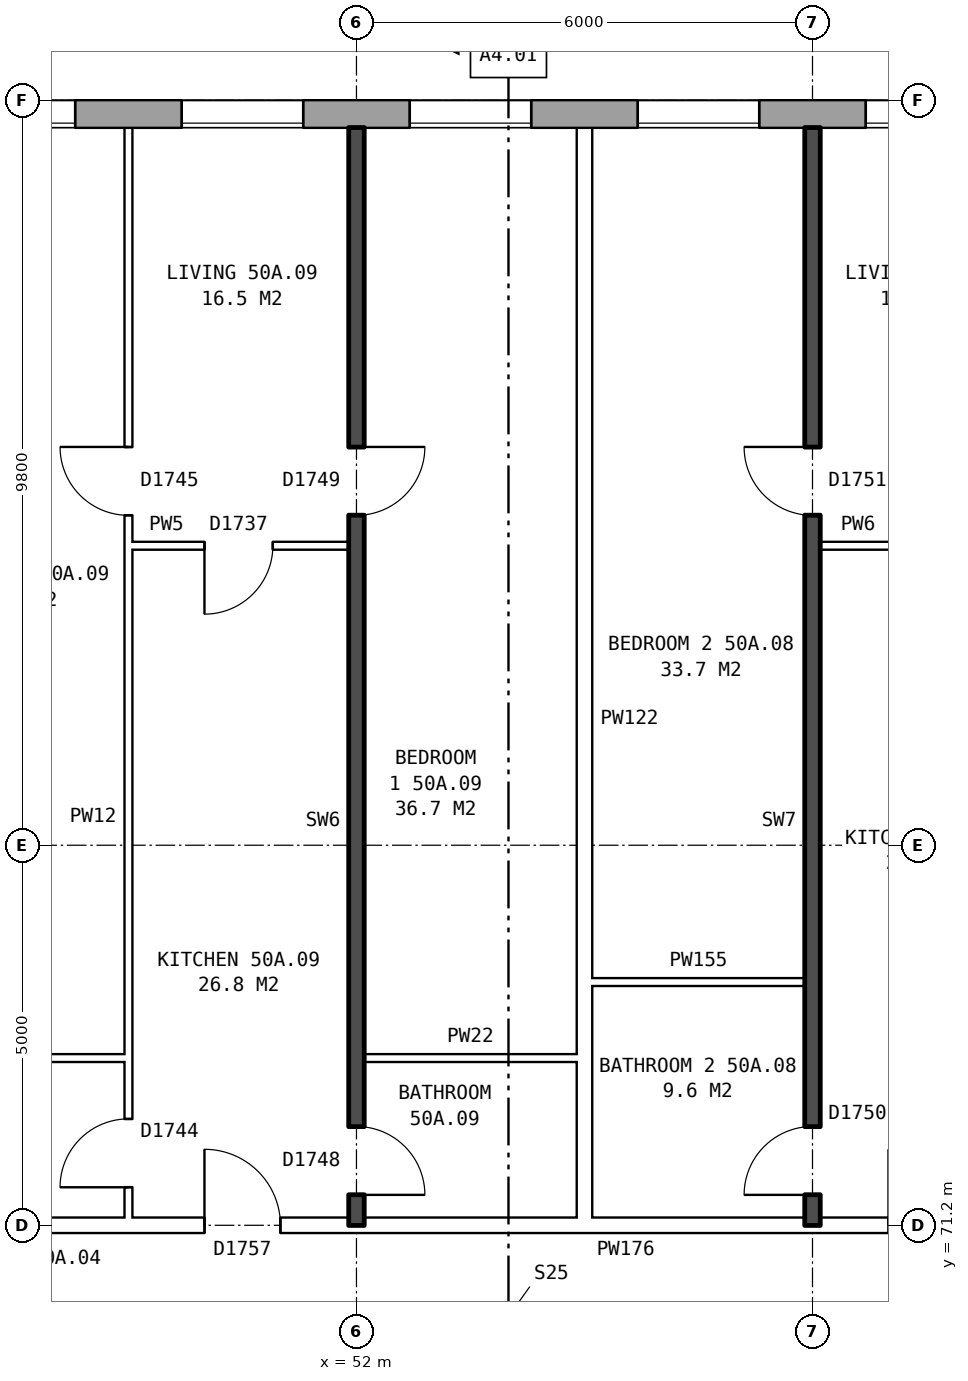
"""IFC4 building model, lengths in metres.
Left out: names, types, materials, properties, quantities, classifications, styles, units other than length and angle.
Written with IfcOpenShell. Run it as: python <this file> out.ifc"""

import sys

from ifc_helpers import new_model, si_unit, direction, frame, frame_2d, origin, place, context, subcontext, project, spatial, rectangle, extrude, element, fill, save


model = new_model("IFC4")
c1 = context("Model", 3, precision=1e-05, world=origin(), true_north=direction((0.0, 1.0)))
c2 = subcontext(c1, "Body", "Model", "MODEL_VIEW")
j1 = project(units=[si_unit("LENGTHUNIT", "METRE"), si_unit("PLANEANGLEUNIT", "RADIAN")], contexts=[c1])
p1 = place(None, origin())
s1 = spatial("IfcSite", under=j1, at=p1, CompositionType="ELEMENT")
p2 = place(p1, origin())
s2 = spatial("IfcBuilding", under=s1, at=p2, CompositionType="ELEMENT")
p3 = place(p2, frame((0.0, 0.0, 178.9)))
s3 = spatial("IfcBuildingStorey", under=s2, at=p3, CompositionType="ELEMENT", Elevation=178.9)
p4 = place(p3, frame((72.925, 85.82, 0.0), z_axis=(0.0, 0.0, 1.0), x_axis=(-1.0, 0.0, 0.0)))
e1 = element("IfcWall", 1, at=p4, inside=s3, PredefinedType="STANDARD", context=c2, shape_type="SweptSolid", body=[
    extrude(rectangle(XDim=39.601, YDim=0.36, at=frame_2d((19.8, 0.0))), origin(), (0.0, 0.0, 1.0), 2.85),
])
p5 = place(p4, frame((0.625, 0.0, 0.8)))
e2 = element("IfcOpeningElement", 2, at=p5, cuts=e1, PredefinedType="OPENING", context=c2, shape_type="SweptSolid", body=[
    extrude(rectangle(XDim=1.6, YDim=1.8, at=frame_2d((0.8, 0.9))), frame((0.0, 0.19, 0.0), z_axis=(0.0, -1.0, 0.0), x_axis=(1.0, 0.0, 0.0)), (0.0, 0.0, 1.0), 0.38),
])
p6 = place(p4, frame((3.125, 0.0, 0.8)))
e3 = element("IfcOpeningElement", 3, at=p6, cuts=e1, PredefinedType="OPENING", context=c2, shape_type="SweptSolid", body=[
    extrude(rectangle(XDim=1.6, YDim=1.8, at=frame_2d((0.8, 0.9))), frame((0.0, 0.19, 0.0), z_axis=(0.0, -1.0, 0.0), x_axis=(1.0, 0.0, 0.0)), (0.0, 0.0, 1.0), 0.38),
])
p7 = place(p4, frame((5.025, 0.0, 1.7)))
e4 = element("IfcOpeningElement", 4, at=p7, cuts=e1, PredefinedType="OPENING", context=c2, shape_type="SweptSolid", body=[
    extrude(rectangle(XDim=0.6, YDim=0.9, at=frame_2d((0.3, 0.45))), frame((0.0, 0.19, 0.0), z_axis=(0.0, -1.0, 0.0), x_axis=(1.0, 0.0, 0.0)), (0.0, 0.0, 1.0), 0.38),
])
p8 = place(p4, frame((9.625, 0.0, 0.8)))
e5 = element("IfcOpeningElement", 5, at=p8, cuts=e1, PredefinedType="OPENING", context=c2, shape_type="SweptSolid", body=[
    extrude(rectangle(XDim=1.6, YDim=1.8, at=frame_2d((0.8, 0.9))), frame((0.0, 0.19, 0.0), z_axis=(0.0, -1.0, 0.0), x_axis=(1.0, 0.0, 0.0)), (0.0, 0.0, 1.0), 0.38),
])
p9 = place(p4, frame((12.625, 0.0, 0.8)))
e6 = element("IfcOpeningElement", 6, at=p9, cuts=e1, PredefinedType="OPENING", context=c2, shape_type="SweptSolid", body=[
    extrude(rectangle(XDim=1.6, YDim=1.8, at=frame_2d((0.8, 0.9))), frame((0.0, 0.19, 0.0), z_axis=(0.0, -1.0, 0.0), x_axis=(1.0, 0.0, 0.0)), (0.0, 0.0, 1.0), 0.38),
])
p10 = place(p4, frame((15.625, 0.0, 0.8)))
e7 = element("IfcOpeningElement", 7, at=p10, cuts=e1, PredefinedType="OPENING", context=c2, shape_type="SweptSolid", body=[
    extrude(rectangle(XDim=1.6, YDim=1.8, at=frame_2d((0.8, 0.9))), frame((0.0, 0.19, 0.0), z_axis=(0.0, -1.0, 0.0), x_axis=(1.0, 0.0, 0.0)), (0.0, 0.0, 1.0), 0.38),
])
p11 = place(p4, frame((18.625, 0.0, 0.8)))
e8 = element("IfcOpeningElement", 8, at=p11, cuts=e1, PredefinedType="OPENING", context=c2, shape_type="SweptSolid", body=[
    extrude(rectangle(XDim=1.6, YDim=1.8, at=frame_2d((0.8, 0.9))), frame((0.0, 0.19, 0.0), z_axis=(0.0, -1.0, 0.0), x_axis=(1.0, 0.0, 0.0)), (0.0, 0.0, 1.0), 0.38),
])
p12 = place(p4, frame((21.625, 0.0, 0.8)))
e9 = element("IfcOpeningElement", 9, at=p12, cuts=e1, PredefinedType="OPENING", context=c2, shape_type="SweptSolid", body=[
    extrude(rectangle(XDim=1.6, YDim=1.8, at=frame_2d((0.8, 0.9))), frame((0.0, 0.19, 0.0), z_axis=(0.0, -1.0, 0.0), x_axis=(1.0, 0.0, 0.0)), (0.0, 0.0, 1.0), 0.38),
])
p13 = place(p4, frame((24.625, 0.0, 0.8)))
e10 = element("IfcOpeningElement", 10, at=p13, cuts=e1, PredefinedType="OPENING", context=c2, shape_type="SweptSolid", body=[
    extrude(rectangle(XDim=1.6, YDim=1.8, at=frame_2d((0.8, 0.9))), frame((0.0, 0.19, 0.0), z_axis=(0.0, -1.0, 0.0), x_axis=(1.0, 0.0, 0.0)), (0.0, 0.0, 1.0), 0.38),
])
p14 = place(p4, frame((27.625, 0.0, 0.8)))
e11 = element("IfcOpeningElement", 11, at=p14, cuts=e1, PredefinedType="OPENING", context=c2, shape_type="SweptSolid", body=[
    extrude(rectangle(XDim=1.6, YDim=1.8, at=frame_2d((0.8, 0.9))), frame((0.0, 0.19, 0.0), z_axis=(0.0, -1.0, 0.0), x_axis=(1.0, 0.0, 0.0)), (0.0, 0.0, 1.0), 0.38),
])
p15 = place(p4, frame((30.625, 0.0, 0.8)))
e12 = element("IfcOpeningElement", 12, at=p15, cuts=e1, PredefinedType="OPENING", context=c2, shape_type="SweptSolid", body=[
    extrude(rectangle(XDim=1.6, YDim=1.8, at=frame_2d((0.8, 0.9))), frame((0.0, 0.19, 0.0), z_axis=(0.0, -1.0, 0.0), x_axis=(1.0, 0.0, 0.0)), (0.0, 0.0, 1.0), 0.38),
])
p16 = place(p4, frame((33.925, 0.0, 1.7)))
e13 = element("IfcOpeningElement", 13, at=p16, cuts=e1, PredefinedType="OPENING", context=c2, shape_type="SweptSolid", body=[
    extrude(rectangle(XDim=0.6, YDim=0.9, at=frame_2d((0.3, 0.45))), frame((0.0, 0.19, 0.0), z_axis=(0.0, -1.0, 0.0), x_axis=(1.0, 0.0, 0.0)), (0.0, 0.0, 1.0), 0.38),
])
p17 = place(p4, frame((36.625, 0.0, 0.8)))
e14 = element("IfcOpeningElement", 14, at=p17, cuts=e1, PredefinedType="OPENING", context=c2, shape_type="SweptSolid", body=[
    extrude(rectangle(XDim=1.6, YDim=1.8, at=frame_2d((0.8, 0.9))), frame((0.0, 0.19, 0.0), z_axis=(0.0, -1.0, 0.0), x_axis=(1.0, 0.0, 0.0)), (0.0, 0.0, 1.0), 0.38),
])
p18 = place(p4, frame((6.825, 0.0, 0.8)))
e15 = element("IfcOpeningElement", 15, at=p18, cuts=e1, PredefinedType="OPENING", context=c2, shape_type="SweptSolid", body=[
    extrude(rectangle(XDim=0.6, YDim=0.9, at=frame_2d((0.3, 0.45))), frame((0.0, 0.19, 0.0), z_axis=(0.0, -1.0, 0.0), x_axis=(1.0, 0.0, 0.0)), (0.0, 0.0, 1.0), 0.38),
])
p19 = place(p4, frame((7.725, 0.0, 0.8)))
e16 = element("IfcOpeningElement", 16, at=p19, cuts=e1, PredefinedType="OPENING", context=c2, shape_type="SweptSolid", body=[
    extrude(rectangle(XDim=1.0, YDim=1.8, at=frame_2d((0.5, 0.9))), frame((0.0, 0.19, 0.0), z_axis=(0.0, -1.0, 0.0), x_axis=(1.0, 0.0, 0.0)), (0.0, 0.0, 1.0), 0.38),
])
p20 = place(p4, frame((34.825, 0.0, 0.8)))
e17 = element("IfcOpeningElement", 17, at=p20, cuts=e1, PredefinedType="OPENING", context=c2, shape_type="SweptSolid", body=[
    extrude(rectangle(XDim=1.4, YDim=1.8, at=frame_2d((0.7, 0.9))), frame((0.0, 0.19, 0.0), z_axis=(0.0, -1.0, 0.0), x_axis=(1.0, 0.0, 0.0)), (0.0, 0.0, 1.0), 0.38),
])
p21 = place(p3, frame((44.36, 71.2, 0.0), z_axis=(0.0, 0.0, 1.0), x_axis=(1.0, 0.0, 0.0)))
e18 = element("IfcWall", 18, at=p21, inside=s3, PredefinedType="PARTITIONING", context=c2, shape_type="SweptSolid", body=[
    extrude(rectangle(XDim=19.28, YDim=0.2, at=frame_2d((9.64, 0.0))), origin(), (0.0, 0.0, 1.0), 2.85),
])
p22 = place(p21, frame((14.64, 0.0, 0.0)))
e19 = element("IfcOpeningElement", 19, at=p22, cuts=e18, PredefinedType="OPENING", context=c2, shape_type="SweptSolid", body=[
    extrude(rectangle(XDim=1.0, YDim=2.1, at=frame_2d((0.5, 1.05))), frame((0.0, 0.11, 0.0), z_axis=(0.0, -1.0, 0.0), x_axis=(1.0, 0.0, 0.0)), (0.0, 0.0, 1.0), 0.22),
])
p23 = place(p21, frame((5.64, 0.0, 0.0)))
e20 = element("IfcOpeningElement", 20, at=p23, cuts=e18, PredefinedType="OPENING", context=c2, shape_type="SweptSolid", body=[
    extrude(rectangle(XDim=1.0, YDim=2.1, at=frame_2d((0.5, 1.05))), frame((0.0, 0.11, 0.0), z_axis=(0.0, -1.0, 0.0), x_axis=(1.0, 0.0, 0.0)), (0.0, 0.0, 1.0), 0.22),
])
p24 = place(p3, frame((46.1, 73.4, 0.0), z_axis=(0.0, 0.0, 1.0), x_axis=(1.0, 0.0, 0.0)))
e21 = element("IfcWall", 21, at=p24, inside=s3, PredefinedType="PARTITIONING", context=c2, shape_type="SweptSolid", body=[
    extrude(rectangle(XDim=2.9, YDim=0.1, at=frame_2d((1.45, 0.0))), origin(), (0.0, 0.0, 1.0), 2.85),
])
for number, where, z_axis, x_axis in (
    (22, (52.1, 73.4, 0.0), (0.0, 0.0, 1.0), (1.0, 0.0, 0.0)),
    (23, (55.1, 74.4, 0.0), (0.0, 0.0, 1.0), (1.0, 0.0, 0.0)),
):
    element("IfcWall", number, at=place(p3, frame(where, z_axis=z_axis, x_axis=x_axis)), inside=s3, PredefinedType="PARTITIONING", context=c2, shape_type="SweptSolid", body=[
        extrude(rectangle(XDim=2.8, YDim=0.1, at=frame_2d((1.4, 0.0))), origin(), (0.0, 0.0, 1.0), 2.85),
    ])
p25 = place(p3, frame((49.0, 80.14, 0.0), z_axis=(0.0, 0.0, 1.0), x_axis=(1.0, 0.0, 0.0)))
e24 = element("IfcWall", 24, at=p25, inside=s3, PredefinedType="PARTITIONING", context=c2, shape_type="SweptSolid", body=[
    extrude(rectangle(XDim=2.9, YDim=0.1, at=frame_2d((1.45, 0.0))), origin(), (0.0, 0.0, 1.0), 2.85),
])
p26 = place(p25, frame((1.0, 0.0, 0.0)))
e25 = element("IfcOpeningElement", 25, at=p26, cuts=e24, PredefinedType="OPENING", context=c2, shape_type="SweptSolid", body=[
    extrude(rectangle(XDim=0.9, YDim=2.1, at=frame_2d((0.45, 1.05))), frame((0.0, 0.06, 0.0), z_axis=(0.0, -1.0, 0.0), x_axis=(1.0, 0.0, 0.0)), (0.0, 0.0, 1.0), 0.12),
])
p27 = place(p3, frame((58.1, 80.14, 0.0), z_axis=(0.0, 0.0, 1.0), x_axis=(1.0, 0.0, 0.0)))
e26 = element("IfcWall", 26, at=p27, inside=s3, PredefinedType="PARTITIONING", context=c2, shape_type="SweptSolid", body=[
    extrude(rectangle(XDim=2.9, YDim=0.1, at=frame_2d((1.45, 0.0))), origin(), (0.0, 0.0, 1.0), 2.85),
])
p28 = place(p27, frame((1.0, 0.0, 0.0)))
e27 = element("IfcOpeningElement", 27, at=p28, cuts=e26, PredefinedType="OPENING", context=c2, shape_type="SweptSolid", body=[
    extrude(rectangle(XDim=0.9, YDim=2.1, at=frame_2d((0.45, 1.05))), frame((0.0, 0.06, 0.0), z_axis=(0.0, -1.0, 0.0), x_axis=(1.0, 0.0, 0.0)), (0.0, 0.0, 1.0), 0.12),
])
p29 = place(p3, frame((49.0, 71.3, 0.0), z_axis=(0.0, 0.0, 1.0), x_axis=(0.0, 1.0, 0.0)))
e28 = element("IfcWall", 28, at=p29, inside=s3, PredefinedType="PARTITIONING", context=c2, shape_type="SweptSolid", body=[
    extrude(rectangle(XDim=14.34, YDim=0.1, at=frame_2d((7.17, 0.0))), origin(), (0.0, 0.0, 1.0), 2.85),
])
p30 = place(p29, frame((9.24, 0.0, 0.0)))
e29 = element("IfcOpeningElement", 29, at=p30, cuts=e28, PredefinedType="OPENING", context=c2, shape_type="SweptSolid", body=[
    extrude(rectangle(XDim=0.9, YDim=2.1, at=frame_2d((0.45, 1.05))), frame((0.0, 0.06, 0.0), z_axis=(0.0, -1.0, 0.0), x_axis=(1.0, 0.0, 0.0)), (0.0, 0.0, 1.0), 0.12),
])
p31 = place(p29, frame((0.4, 0.0, 0.0)))
e30 = element("IfcOpeningElement", 30, at=p31, cuts=e28, PredefinedType="OPENING", context=c2, shape_type="SweptSolid", body=[
    extrude(rectangle(XDim=0.9, YDim=2.1, at=frame_2d((0.45, 1.05))), frame((0.0, 0.06, 0.0), z_axis=(0.0, -1.0, 0.0), x_axis=(1.0, 0.0, 0.0)), (0.0, 0.0, 1.0), 0.12),
])
p32 = place(p3, frame((52.0, 71.2, 0.0), z_axis=(0.0, 0.0, 1.0), x_axis=(0.0, 1.0, 0.0)))
e31 = element("IfcWall", 31, at=p32, inside=s3, PredefinedType="SOLIDWALL", context=c2, shape_type="SweptSolid", body=[
    extrude(rectangle(XDim=14.44, YDim=0.2, at=frame_2d((7.22, 0.0))), origin(), (0.0, 0.0, 1.0), 2.85),
])
p33 = place(p32, frame((9.34, 0.0, 0.0)))
e32 = element("IfcOpeningElement", 32, at=p33, cuts=e31, PredefinedType="OPENING", context=c2, shape_type="SweptSolid", body=[
    extrude(rectangle(XDim=0.9, YDim=2.1, at=frame_2d((0.45, 1.05))), frame((0.0, 0.11, 0.0), z_axis=(0.0, -1.0, 0.0), x_axis=(1.0, 0.0, 0.0)), (0.0, 0.0, 1.0), 0.22),
])
p34 = place(p32, frame((0.4, 0.0, 0.0)))
e33 = element("IfcOpeningElement", 33, at=p34, cuts=e31, PredefinedType="OPENING", context=c2, shape_type="SweptSolid", body=[
    extrude(rectangle(XDim=0.9, YDim=2.1, at=frame_2d((0.45, 1.05))), frame((0.0, 0.11, 0.0), z_axis=(0.0, -1.0, 0.0), x_axis=(1.0, 0.0, 0.0)), (0.0, 0.0, 1.0), 0.22),
])
p35 = place(p3, frame((55.0, 71.3, 0.0), z_axis=(0.0, 0.0, 1.0), x_axis=(0.0, 1.0, 0.0)))
e34 = element("IfcWall", 34, at=p35, inside=s3, PredefinedType="PARTITIONING", context=c2, shape_type="SweptSolid", body=[
    extrude(rectangle(XDim=14.34, YDim=0.2, at=frame_2d((7.17, 0.0))), origin(), (0.0, 0.0, 1.0), 2.85),
])
p36 = place(p3, frame((58.0, 71.2, 0.0), z_axis=(0.0, 0.0, 1.0), x_axis=(0.0, 1.0, 0.0)))
e35 = element("IfcWall", 35, at=p36, inside=s3, PredefinedType="SOLIDWALL", context=c2, shape_type="SweptSolid", body=[
    extrude(rectangle(XDim=14.44, YDim=0.2, at=frame_2d((7.22, 0.0))), origin(), (0.0, 0.0, 1.0), 2.85),
])
p37 = place(p36, frame((9.34, 0.0, 0.0)))
e36 = element("IfcOpeningElement", 36, at=p37, cuts=e35, PredefinedType="OPENING", context=c2, shape_type="SweptSolid", body=[
    extrude(rectangle(XDim=0.9, YDim=2.1, at=frame_2d((0.45, 1.05))), frame((0.0, 0.11, 0.0), z_axis=(0.0, -1.0, 0.0), x_axis=(1.0, 0.0, 0.0)), (0.0, 0.0, 1.0), 0.22),
])
p38 = place(p36, frame((0.4, 0.0, 0.0)))
e37 = element("IfcOpeningElement", 37, at=p38, cuts=e35, PredefinedType="OPENING", context=c2, shape_type="SweptSolid", body=[
    extrude(rectangle(XDim=0.9, YDim=2.1, at=frame_2d((0.45, 1.05))), frame((0.0, 0.11, 0.0), z_axis=(0.0, -1.0, 0.0), x_axis=(1.0, 0.0, 0.0)), (0.0, 0.0, 1.0), 0.22),
])
p39 = place(p9, origin())
e38 = element("IfcWindow", 38, at=p39, inside=s3, PartitioningType="SINGLE_PANEL", PredefinedType="WINDOW", context=c2, shape_type="SweptSolid", body=[
    extrude(rectangle(XDim=1.6, YDim=1.8, at=frame_2d((0.8, 0.9))), frame((0.0, 0.15, 0.0), z_axis=(0.0, -1.0, 0.0), x_axis=(1.0, 0.0, 0.0)), (0.0, 0.0, 1.0), 0.06),
])
fill(e6, e38)
p40 = place(p10, origin())
e39 = element("IfcWindow", 39, at=p40, inside=s3, PartitioningType="SINGLE_PANEL", PredefinedType="WINDOW", context=c2, shape_type="SweptSolid", body=[
    extrude(rectangle(XDim=1.6, YDim=1.8, at=frame_2d((0.8, 0.9))), frame((0.0, 0.15, 0.0), z_axis=(0.0, -1.0, 0.0), x_axis=(1.0, 0.0, 0.0)), (0.0, 0.0, 1.0), 0.06),
])
fill(e7, e39)
p41 = place(p11, origin())
e40 = element("IfcWindow", 40, at=p41, inside=s3, PartitioningType="SINGLE_PANEL", PredefinedType="WINDOW", context=c2, shape_type="SweptSolid", body=[
    extrude(rectangle(XDim=1.6, YDim=1.8, at=frame_2d((0.8, 0.9))), frame((0.0, 0.15, 0.0), z_axis=(0.0, -1.0, 0.0), x_axis=(1.0, 0.0, 0.0)), (0.0, 0.0, 1.0), 0.06),
])
fill(e8, e40)
p42 = place(p12, origin())
e41 = element("IfcWindow", 41, at=p42, inside=s3, PartitioningType="SINGLE_PANEL", PredefinedType="WINDOW", context=c2, shape_type="SweptSolid", body=[
    extrude(rectangle(XDim=1.6, YDim=1.8, at=frame_2d((0.8, 0.9))), frame((0.0, 0.15, 0.0), z_axis=(0.0, -1.0, 0.0), x_axis=(1.0, 0.0, 0.0)), (0.0, 0.0, 1.0), 0.06),
])
fill(e9, e41)
p43 = place(p13, origin())
e42 = element("IfcWindow", 42, at=p43, inside=s3, PartitioningType="SINGLE_PANEL", PredefinedType="WINDOW", context=c2, shape_type="SweptSolid", body=[
    extrude(rectangle(XDim=1.6, YDim=1.8, at=frame_2d((0.8, 0.9))), frame((0.0, 0.15, 0.0), z_axis=(0.0, -1.0, 0.0), x_axis=(1.0, 0.0, 0.0)), (0.0, 0.0, 1.0), 0.06),
])
fill(e10, e42)
p44 = place(p37, origin())
e43 = element("IfcDoor", 43, at=p44, inside=s3, OperationType="SINGLE_SWING_RIGHT", PredefinedType="DOOR", context=c2, shape_type="SweptSolid", body=[
    extrude(rectangle(XDim=0.9, YDim=2.1, at=frame_2d((0.45, 1.05))), frame((0.0, 0.025, 0.0), z_axis=(0.0, -1.0, 0.0), x_axis=(1.0, 0.0, 0.0)), (0.0, 0.0, 1.0), 0.05),
])
fill(e36, e43)
p45 = place(p38, origin())
e44 = element("IfcDoor", 44, at=p45, inside=s3, OperationType="SINGLE_SWING_LEFT", PredefinedType="DOOR", context=c2, shape_type="SweptSolid", body=[
    extrude(rectangle(XDim=0.9, YDim=2.1, at=frame_2d((0.45, 1.05))), frame((0.0, 0.025, 0.0), z_axis=(0.0, -1.0, 0.0), x_axis=(1.0, 0.0, 0.0)), (0.0, 0.0, 1.0), 0.05),
])
fill(e37, e44)
p46 = place(p33, frame((0.9, 0.0, 0.0), z_axis=(0.0, 0.0, 1.0), x_axis=(-1.0, 0.0, 0.0)))
e45 = element("IfcDoor", 45, at=p46, inside=s3, OperationType="SINGLE_SWING_LEFT", PredefinedType="DOOR", context=c2, shape_type="SweptSolid", body=[
    extrude(rectangle(XDim=0.9, YDim=2.1, at=frame_2d((0.45, 1.05))), frame((0.0, 0.025, 0.0), z_axis=(0.0, -1.0, 0.0), x_axis=(1.0, 0.0, 0.0)), (0.0, 0.0, 1.0), 0.05),
])
fill(e32, e45)
p47 = place(p30, origin())
e46 = element("IfcDoor", 46, at=p47, inside=s3, OperationType="SINGLE_SWING_RIGHT", PredefinedType="DOOR", context=c2, shape_type="SweptSolid", body=[
    extrude(rectangle(XDim=0.9, YDim=2.1, at=frame_2d((0.45, 1.05))), frame((0.0, 0.025, 0.0), z_axis=(0.0, -1.0, 0.0), x_axis=(1.0, 0.0, 0.0)), (0.0, 0.0, 1.0), 0.05),
])
fill(e29, e46)
p48 = place(p23, origin())
e47 = element("IfcDoor", 47, at=p48, inside=s3, OperationType="SINGLE_SWING_LEFT", PredefinedType="DOOR", context=c2, shape_type="SweptSolid", body=[
    extrude(rectangle(XDim=1.0, YDim=2.1, at=frame_2d((0.5, 1.05))), frame((0.0, 0.025, 0.0), z_axis=(0.0, -1.0, 0.0), x_axis=(1.0, 0.0, 0.0)), (0.0, 0.0, 1.0), 0.05),
])
fill(e20, e47)
p49 = place(p26, frame((0.9, 0.0, 0.0), z_axis=(0.0, 0.0, 1.0), x_axis=(-1.0, 0.0, 0.0)))
e48 = element("IfcDoor", 48, at=p49, inside=s3, OperationType="SINGLE_SWING_RIGHT", PredefinedType="DOOR", context=c2, shape_type="SweptSolid", body=[
    extrude(rectangle(XDim=0.9, YDim=2.1, at=frame_2d((0.45, 1.05))), frame((0.0, 0.025, 0.0), z_axis=(0.0, -1.0, 0.0), x_axis=(1.0, 0.0, 0.0)), (0.0, 0.0, 1.0), 0.05),
])
fill(e25, e48)
p50 = place(p34, frame((0.9, 0.0, 0.0), z_axis=(0.0, 0.0, 1.0), x_axis=(-1.0, 0.0, 0.0)))
e49 = element("IfcDoor", 49, at=p50, inside=s3, OperationType="SINGLE_SWING_RIGHT", PredefinedType="DOOR", context=c2, shape_type="SweptSolid", body=[
    extrude(rectangle(XDim=0.9, YDim=2.1, at=frame_2d((0.45, 1.05))), frame((0.0, 0.025, 0.0), z_axis=(0.0, -1.0, 0.0), x_axis=(1.0, 0.0, 0.0)), (0.0, 0.0, 1.0), 0.05),
])
fill(e33, e49)
p51 = place(p31, origin())
e50 = element("IfcDoor", 50, at=p51, inside=s3, OperationType="SINGLE_SWING_LEFT", PredefinedType="DOOR", context=c2, shape_type="SweptSolid", body=[
    extrude(rectangle(XDim=0.9, YDim=2.1, at=frame_2d((0.45, 1.05))), frame((0.0, 0.025, 0.0), z_axis=(0.0, -1.0, 0.0), x_axis=(1.0, 0.0, 0.0)), (0.0, 0.0, 1.0), 0.05),
])
fill(e30, e50)
save(model, sys.argv[1])
